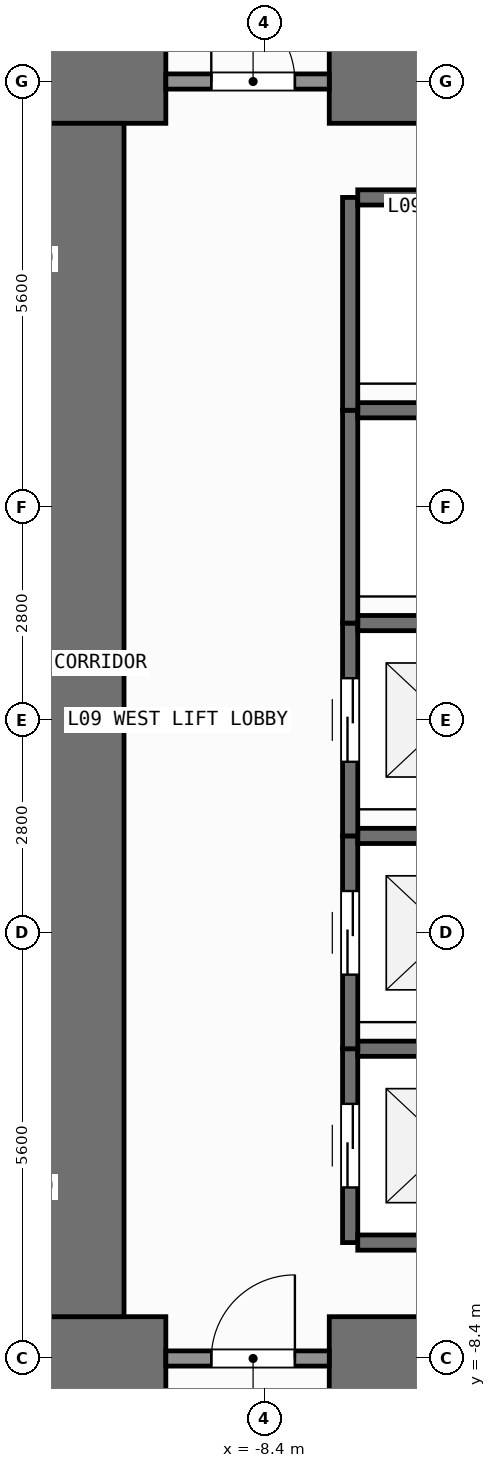
"""IFC4 building model, lengths in metres.
Left out: names, types, materials, properties, quantities, classifications, styles, units other than length and angle.
Written with IfcOpenShell. Run it as: python <this file> out.ifc"""

import sys

from ifc_helpers import new_model, si_unit, direction, frame, frame_2d, origin, place, context, subcontext, project, spatial, rectangle, extrude, element, fill, save


model = new_model("IFC4")
c1 = context("Model", 3, precision=1e-05, world=origin(), true_north=direction((0.0, 1.0)))
c2 = subcontext(c1, "Body", "Model", "MODEL_VIEW")
j1 = project(units=[si_unit("LENGTHUNIT", "METRE"), si_unit("PLANEANGLEUNIT", "RADIAN")], contexts=[c1])
p1 = place(None, origin())
s1 = spatial("IfcSite", under=j1, at=p1, CompositionType="ELEMENT")
p2 = place(p1, origin())
s2 = spatial("IfcBuilding", under=s1, at=p2, CompositionType="ELEMENT")
p3 = place(p2, frame((0.0, 0.0, 34.5)))
s3 = spatial("IfcBuildingStorey", under=s2, at=p3, CompositionType="ELEMENT", Elevation=34.5)
p4 = place(p3, frame((-11.35, -8.4, 0.0), z_axis=(0.0, 0.0, 1.0), x_axis=(1.0, 0.0, 0.0)))
e1 = element("IfcWall", 1, at=p4, inside=s3, PredefinedType="SHEAR", context=c2, shape_type="SweptSolid", body=[
    extrude(rectangle(XDim=1.65, YDim=1.1, at=frame_2d((0.825, 0.0))), origin(), (0.0, 0.0, 1.0), 3.9),
])
p5 = place(p3, frame((-7.55, -8.4, 0.0), z_axis=(0.0, 0.0, 1.0), x_axis=(1.0, 0.0, 0.0)))
e2 = element("IfcWall", 2, at=p5, inside=s3, PredefinedType="SHEAR", context=c2, shape_type="SweptSolid", body=[
    extrude(rectangle(XDim=3.35, YDim=1.1, at=frame_2d((1.675, 0.0))), origin(), (0.0, 0.0, 1.0), 3.9),
])
p6 = place(p3, frame((-11.35, 8.4, 0.0), z_axis=(0.0, 0.0, 1.0), x_axis=(1.0, 0.0, 0.0)))
e3 = element("IfcWall", 3, at=p6, inside=s3, PredefinedType="SHEAR", context=c2, shape_type="SweptSolid", body=[
    extrude(rectangle(XDim=1.65, YDim=1.1, at=frame_2d((0.825, 0.0))), origin(), (0.0, 0.0, 1.0), 3.9),
])
p7 = place(p3, frame((-7.55, 8.4, 0.0), z_axis=(0.0, 0.0, 1.0), x_axis=(1.0, 0.0, 0.0)))
e4 = element("IfcWall", 4, at=p7, inside=s3, PredefinedType="SHEAR", context=c2, shape_type="SweptSolid", body=[
    extrude(rectangle(XDim=16.5, YDim=1.1, at=frame_2d((8.25, 0.0))), origin(), (0.0, 0.0, 1.0), 3.9),
])
p8 = place(p3, frame((-10.8, -7.85, 0.0), z_axis=(0.0, 0.0, 1.0), x_axis=(0.0, 1.0, 0.0)))
e5 = element("IfcWall", 5, at=p8, inside=s3, PredefinedType="SHEAR", context=c2, shape_type="SweptSolid", body=[
    extrude(rectangle(XDim=15.7, YDim=1.1, at=frame_2d((7.85, 0.0))), origin(), (0.0, 0.0, 1.0), 3.9),
])
p9 = place(p3, frame((-7.275, -6.875, 0.0), z_axis=(0.0, 0.0, 1.0), x_axis=(0.0, 1.0, 0.0)))
e6 = element("IfcWall", 6, at=p9, inside=s3, PredefinedType="SHEAR", context=c2, shape_type="SweptSolid", body=[
    extrude(rectangle(XDim=2.55, YDim=0.2, at=frame_2d((1.275, 0.0))), origin(), (0.0, 0.0, 1.0), 3.68),
])
p10 = place(p9, frame((0.725, 0.0, 0.0)))
e7 = element("IfcOpeningElement", 7, at=p10, cuts=e6, PredefinedType="OPENING", context=c2, shape_type="SweptSolid", body=[
    extrude(rectangle(XDim=1.1, YDim=2.2, at=frame_2d((0.55, 1.1))), frame((0.0, 0.11, 0.0), z_axis=(0.0, -1.0, 0.0), x_axis=(1.0, 0.0, 0.0)), (0.0, 0.0, 1.0), 0.22),
])
for number, where, z_axis, x_axis in (
    (8, (-7.175, -6.875, 0.0), (0.0, 0.0, 1.0), (1.0, 0.0, 0.0)),
    (9, (-7.175, -4.325, 0.0), (0.0, 0.0, 1.0), (1.0, 0.0, 0.0)),
):
    element("IfcWall", number, at=place(p3, frame(where, z_axis=z_axis, x_axis=x_axis)), inside=s3, PredefinedType="SHEAR", context=c2, shape_type="SweptSolid", body=[
        extrude(rectangle(XDim=2.35, YDim=0.2, at=frame_2d((1.175, 0.0))), origin(), (0.0, 0.0, 1.0), 3.68),
    ])
p11 = place(p3, frame((-7.275, -4.325, 0.0), z_axis=(0.0, 0.0, 1.0), x_axis=(0.0, 1.0, 0.0)))
e10 = element("IfcWall", 10, at=p11, inside=s3, PredefinedType="SHEAR", context=c2, shape_type="SweptSolid", body=[
    extrude(rectangle(XDim=2.8, YDim=0.2, at=frame_2d((1.4, 0.0))), origin(), (0.0, 0.0, 1.0), 3.68),
])
p12 = place(p11, frame((0.975, 0.0, 0.0)))
e11 = element("IfcOpeningElement", 11, at=p12, cuts=e10, PredefinedType="OPENING", context=c2, shape_type="SweptSolid", body=[
    extrude(rectangle(XDim=1.1, YDim=2.2, at=frame_2d((0.55, 1.1))), frame((0.0, 0.11, 0.0), z_axis=(0.0, -1.0, 0.0), x_axis=(1.0, 0.0, 0.0)), (0.0, 0.0, 1.0), 0.22),
])
p13 = place(p3, frame((-7.175, -1.525, 0.0), z_axis=(0.0, 0.0, 1.0), x_axis=(1.0, 0.0, 0.0)))
e12 = element("IfcWall", 12, at=p13, inside=s3, PredefinedType="SHEAR", context=c2, shape_type="SweptSolid", body=[
    extrude(rectangle(XDim=2.35, YDim=0.2, at=frame_2d((1.175, 0.0))), origin(), (0.0, 0.0, 1.0), 3.68),
])
p14 = place(p3, frame((-7.275, -1.525, 0.0), z_axis=(0.0, 0.0, 1.0), x_axis=(0.0, 1.0, 0.0)))
e13 = element("IfcWall", 13, at=p14, inside=s3, PredefinedType="SHEAR", context=c2, shape_type="SweptSolid", body=[
    extrude(rectangle(XDim=2.8, YDim=0.2, at=frame_2d((1.4, 0.0))), origin(), (0.0, 0.0, 1.0), 3.68),
])
p15 = place(p14, frame((0.975, 0.0, 0.0)))
e14 = element("IfcOpeningElement", 14, at=p15, cuts=e13, PredefinedType="OPENING", context=c2, shape_type="SweptSolid", body=[
    extrude(rectangle(XDim=1.1, YDim=2.2, at=frame_2d((0.55, 1.1))), frame((0.0, 0.11, 0.0), z_axis=(0.0, -1.0, 0.0), x_axis=(1.0, 0.0, 0.0)), (0.0, 0.0, 1.0), 0.22),
])
p16 = place(p3, frame((-7.175, 1.275, 0.0), z_axis=(0.0, 0.0, 1.0), x_axis=(1.0, 0.0, 0.0)))
e15 = element("IfcWall", 15, at=p16, inside=s3, PredefinedType="SHEAR", context=c2, shape_type="SweptSolid", body=[
    extrude(rectangle(XDim=2.35, YDim=0.2, at=frame_2d((1.175, 0.0))), origin(), (0.0, 0.0, 1.0), 3.68),
])
p17 = place(p3, frame((-7.275, 1.275, 0.0), z_axis=(0.0, 0.0, 1.0), x_axis=(0.0, 1.0, 0.0)))
e16 = element("IfcWall", 16, at=p17, inside=s3, PredefinedType="SHEAR", context=c2, shape_type="SweptSolid", body=[
    extrude(rectangle(XDim=2.8, YDim=0.2, at=frame_2d((1.4, 0.0))), origin(), (0.0, 0.0, 1.0), 3.68),
])
p18 = place(p3, frame((-7.175, 4.075, 0.0), z_axis=(0.0, 0.0, 1.0), x_axis=(1.0, 0.0, 0.0)))
e17 = element("IfcWall", 17, at=p18, inside=s3, PredefinedType="SHEAR", context=c2, shape_type="SweptSolid", body=[
    extrude(rectangle(XDim=2.35, YDim=0.2, at=frame_2d((1.175, 0.0))), origin(), (0.0, 0.0, 1.0), 3.68),
])
p19 = place(p3, frame((-7.275, 4.075, 0.0), z_axis=(0.0, 0.0, 1.0), x_axis=(0.0, 1.0, 0.0)))
e18 = element("IfcWall", 18, at=p19, inside=s3, PredefinedType="SHEAR", context=c2, shape_type="SweptSolid", body=[
    extrude(rectangle(XDim=2.8, YDim=0.2, at=frame_2d((1.4, 0.0))), origin(), (0.0, 0.0, 1.0), 3.68),
])
p20 = place(p3, frame((-7.175, 6.875, 0.0), z_axis=(0.0, 0.0, 1.0), x_axis=(1.0, 0.0, 0.0)))
e19 = element("IfcWall", 19, at=p20, inside=s3, PredefinedType="SHEAR", context=c2, shape_type="SweptSolid", body=[
    extrude(rectangle(XDim=2.35, YDim=0.2, at=frame_2d((1.175, 0.0))), origin(), (0.0, 0.0, 1.0), 3.68),
])
p21 = place(p3, frame((-9.7, -8.4, 0.0), z_axis=(0.0, 0.0, 1.0), x_axis=(1.0, 0.0, 0.0)))
e20 = element("IfcWall", 20, at=p21, inside=s3, PredefinedType="SOLIDWALL", context=c2, shape_type="SweptSolid", body=[
    extrude(rectangle(XDim=2.15, YDim=0.2, at=frame_2d((1.075, 0.0))), origin(), (0.0, 0.0, 1.0), 2.72),
])
p22 = place(p21, frame((0.598, 0.0, 0.0)))
e21 = element("IfcOpeningElement", 21, at=p22, cuts=e20, PredefinedType="OPENING", context=c2, shape_type="SweptSolid", body=[
    extrude(rectangle(XDim=1.1, YDim=2.15, at=frame_2d((0.55, 1.075))), frame((0.0, 0.11, 0.0), z_axis=(0.0, -1.0, 0.0), x_axis=(1.0, 0.0, 0.0)), (0.0, 0.0, 1.0), 0.22),
])
p23 = place(p3, frame((-9.7, 8.4, 0.0), z_axis=(0.0, 0.0, 1.0), x_axis=(1.0, 0.0, 0.0)))
e22 = element("IfcWall", 22, at=p23, inside=s3, PredefinedType="SOLIDWALL", context=c2, shape_type="SweptSolid", body=[
    extrude(rectangle(XDim=2.15, YDim=0.2, at=frame_2d((1.075, 0.0))), origin(), (0.0, 0.0, 1.0), 2.72),
])
p24 = place(p23, frame((0.598, 0.0, 0.0)))
e23 = element("IfcOpeningElement", 23, at=p24, cuts=e22, PredefinedType="OPENING", context=c2, shape_type="SweptSolid", body=[
    extrude(rectangle(XDim=1.1, YDim=2.15, at=frame_2d((0.55, 1.075))), frame((0.0, 0.11, 0.0), z_axis=(0.0, -1.0, 0.0), x_axis=(1.0, 0.0, 0.0)), (0.0, 0.0, 1.0), 0.22),
])
p25 = place(p10, origin())
e24 = element("IfcDoor", 24, at=p25, inside=s3, OperationType="SLIDING_TO_LEFT", PredefinedType="DOOR", context=c2, shape_type="SweptSolid", body=[
    extrude(rectangle(XDim=1.1, YDim=2.2, at=frame_2d((0.55, 1.1))), frame((0.0, 0.025, 0.0), z_axis=(0.0, -1.0, 0.0), x_axis=(1.0, 0.0, 0.0)), (0.0, 0.0, 1.0), 0.05),
])
fill(e7, e24)
p26 = place(p12, origin())
e25 = element("IfcDoor", 25, at=p26, inside=s3, OperationType="SLIDING_TO_LEFT", PredefinedType="DOOR", context=c2, shape_type="SweptSolid", body=[
    extrude(rectangle(XDim=1.1, YDim=2.2, at=frame_2d((0.55, 1.1))), frame((0.0, 0.025, 0.0), z_axis=(0.0, -1.0, 0.0), x_axis=(1.0, 0.0, 0.0)), (0.0, 0.0, 1.0), 0.05),
])
fill(e11, e25)
p27 = place(p15, origin())
e26 = element("IfcDoor", 26, at=p27, inside=s3, OperationType="SLIDING_TO_LEFT", PredefinedType="DOOR", context=c2, shape_type="SweptSolid", body=[
    extrude(rectangle(XDim=1.1, YDim=2.2, at=frame_2d((0.55, 1.1))), frame((0.0, 0.025, 0.0), z_axis=(0.0, -1.0, 0.0), x_axis=(1.0, 0.0, 0.0)), (0.0, 0.0, 1.0), 0.05),
])
fill(e14, e26)
p28 = place(p22, origin())
e27 = element("IfcDoor", 27, at=p28, inside=s3, OperationType="SINGLE_SWING_RIGHT", PredefinedType="DOOR", context=c2, shape_type="SweptSolid", body=[
    extrude(rectangle(XDim=1.1, YDim=2.15, at=frame_2d((0.55, 1.075))), frame((0.0, 0.025, 0.0), z_axis=(0.0, -1.0, 0.0), x_axis=(1.0, 0.0, 0.0)), (0.0, 0.0, 1.0), 0.05),
])
fill(e21, e27)
p29 = place(p24, origin())
e28 = element("IfcDoor", 28, at=p29, inside=s3, OperationType="SINGLE_SWING_LEFT", PredefinedType="DOOR", context=c2, shape_type="SweptSolid", body=[
    extrude(rectangle(XDim=1.1, YDim=2.15, at=frame_2d((0.55, 1.075))), frame((0.0, 0.025, 0.0), z_axis=(0.0, -1.0, 0.0), x_axis=(1.0, 0.0, 0.0)), (0.0, 0.0, 1.0), 0.05),
])
fill(e23, e28)
save(model, sys.argv[1])
